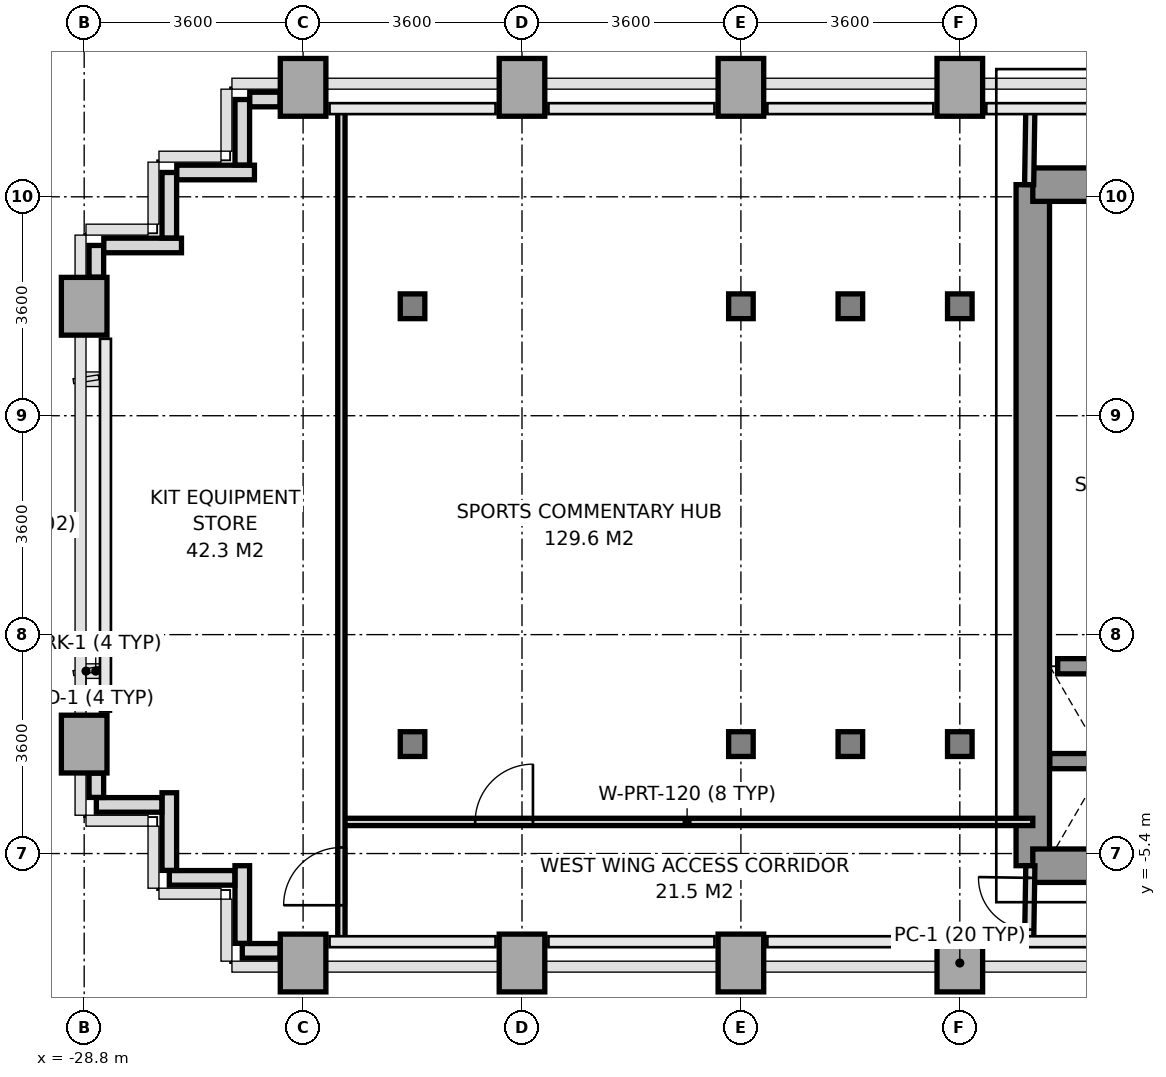
"""IFC4 building model, lengths in metres.
Left out: names, types, materials, properties, quantities, classifications, styles, units other than length and angle.
Written with IfcOpenShell. Run it as: python <this file> out.ifc"""

import sys

from ifc_helpers import new_model, si_unit, direction, frame, frame_2d, origin, origin_2d, place, context, subcontext, project, spatial, rectangle, i_section, extrude, source, transform, mapped, element, fill, save


model = new_model("IFC4")
c1 = context("Model", 3, precision=1e-05, world=origin(), true_north=direction((0.0, 1.0)))
c2 = subcontext(c1, "Body", "Model", "MODEL_VIEW")
j1 = project(units=[si_unit("LENGTHUNIT", "METRE"), si_unit("PLANEANGLEUNIT", "RADIAN")], contexts=[c1])
p1 = place(None, origin())
s1 = spatial("IfcSite", under=j1, at=p1, CompositionType="ELEMENT")
p2 = place(p1, origin())
s2 = spatial("IfcBuilding", under=s1, at=p2, CompositionType="ELEMENT")
p3 = place(p2, frame((0.0, 0.0, 78.2)))
s3 = spatial("IfcBuildingStorey", under=s2, at=p3, CompositionType="ELEMENT", Elevation=78.2)
m1 = source(origin(), c2, "Body", "SweptSolid", [
    extrude(rectangle(XDim=0.75, YDim=0.95, at=origin_2d()), origin(), (0.0, 0.0, 1.0), 3.2),
])
for number, where, z_axis, x_axis in (
    (1, (-28.8, -3.6, 0.0), (0.0, 0.0, 1.0), (1.0, 0.0, 0.0)),
    (2, (-28.8, 3.6, 0.0), (0.0, 0.0, 1.0), (1.0, 0.0, 0.0)),
    (3, (-25.2, -7.2, 0.0), (0.0, 0.0, 1.0), (1.0, 0.0, 0.0)),
    (4, (-25.2, 7.2, 0.0), (0.0, 0.0, 1.0), (1.0, 0.0, 0.0)),
):
    element("IfcColumn", number, at=place(p3, frame(where, z_axis=z_axis, x_axis=x_axis)), inside=s3, PredefinedType="COLUMN", context=c2, shape_type="MappedRepresentation", body=[
        mapped(m1, transform((0.0, 0.0, 0.0), x_axis=(1.0, 0.0, 0.0), y_axis=(0.0, 1.0, 0.0), z_axis=(0.0, 0.0, 1.0), scale=1.0)),
    ])
m2 = source(origin(), c2, "Body", "SweptSolid", [
    extrude(i_section(OverallWidth=0.404, OverallDepth=0.407, WebThickness=0.022, FlangeThickness=0.035, at=origin_2d()), origin(), (0.0, 0.0, 1.0), 3.2),
])
for number, where, z_axis, x_axis in (
    (5, (-23.4, -3.6, 0.0), (0.0, 0.0, 1.0), (1.0, 0.0, 0.0)),
    (6, (-23.4, 3.6, 0.0), (0.0, 0.0, 1.0), (1.0, 0.0, 0.0)),
):
    element("IfcColumn", number, at=place(p3, frame(where, z_axis=z_axis, x_axis=x_axis)), inside=s3, PredefinedType="COLUMN", context=c2, shape_type="MappedRepresentation", body=[
        mapped(m2, transform((0.0, 0.0, 0.0), x_axis=(1.0, 0.0, 0.0), y_axis=(0.0, 1.0, 0.0), z_axis=(0.0, 0.0, 1.0), scale=1.0)),
    ])
for number, where, z_axis, x_axis in (
    (7, (-21.6, -7.2, 0.0), (0.0, 0.0, 1.0), (1.0, 0.0, 0.0)),
    (8, (-21.6, 7.2, 0.0), (0.0, 0.0, 1.0), (1.0, 0.0, 0.0)),
    (9, (-18.0, -7.2, 0.0), (0.0, 0.0, 1.0), (1.0, 0.0, 0.0)),
):
    element("IfcColumn", number, at=place(p3, frame(where, z_axis=z_axis, x_axis=x_axis)), inside=s3, PredefinedType="COLUMN", context=c2, shape_type="MappedRepresentation", body=[
        mapped(m1, transform((0.0, 0.0, 0.0), x_axis=(1.0, 0.0, 0.0), y_axis=(0.0, 1.0, 0.0), z_axis=(0.0, 0.0, 1.0), scale=1.0)),
    ])
for number, where, z_axis, x_axis in (
    (10, (-18.0, -3.6, 0.0), (0.0, 0.0, 1.0), (1.0, 0.0, 0.0)),
    (11, (-18.0, 3.6, 0.0), (0.0, 0.0, 1.0), (1.0, 0.0, 0.0)),
):
    element("IfcColumn", number, at=place(p3, frame(where, z_axis=z_axis, x_axis=x_axis)), inside=s3, PredefinedType="COLUMN", context=c2, shape_type="MappedRepresentation", body=[
        mapped(m2, transform((0.0, 0.0, 0.0), x_axis=(1.0, 0.0, 0.0), y_axis=(0.0, 1.0, 0.0), z_axis=(0.0, 0.0, 1.0), scale=1.0)),
    ])
p4 = place(p3, frame((-18.0, 7.2, 0.0), z_axis=(0.0, 0.0, 1.0), x_axis=(1.0, 0.0, 0.0)))
e12 = element("IfcColumn", 12, at=p4, inside=s3, PredefinedType="COLUMN", context=c2, shape_type="MappedRepresentation", body=[
    mapped(m1, transform((0.0, 0.0, 0.0), x_axis=(1.0, 0.0, 0.0), y_axis=(0.0, 1.0, 0.0), z_axis=(0.0, 0.0, 1.0), scale=1.0)),
])
for number, where, z_axis, x_axis in (
    (13, (-16.2, -3.6, 0.0), (0.0, 0.0, 1.0), (1.0, 0.0, 0.0)),
    (14, (-16.2, 3.6, 0.0), (0.0, 0.0, 1.0), (1.0, 0.0, 0.0)),
):
    element("IfcColumn", number, at=place(p3, frame(where, z_axis=z_axis, x_axis=x_axis)), inside=s3, PredefinedType="COLUMN", context=c2, shape_type="MappedRepresentation", body=[
        mapped(m2, transform((0.0, 0.0, 0.0), x_axis=(1.0, 0.0, 0.0), y_axis=(0.0, 1.0, 0.0), z_axis=(0.0, 0.0, 1.0), scale=1.0)),
    ])
p5 = place(p3, frame((-14.4, -7.2, 0.0), z_axis=(0.0, 0.0, 1.0), x_axis=(1.0, 0.0, 0.0)))
e15 = element("IfcColumn", 15, at=p5, inside=s3, PredefinedType="COLUMN", context=c2, shape_type="MappedRepresentation", body=[
    mapped(m1, transform((0.0, 0.0, 0.0), x_axis=(1.0, 0.0, 0.0), y_axis=(0.0, 1.0, 0.0), z_axis=(0.0, 0.0, 1.0), scale=1.0)),
])
for number, where, z_axis, x_axis in (
    (16, (-14.4, -3.6, 0.0), (0.0, 0.0, 1.0), (1.0, 0.0, 0.0)),
    (17, (-14.4, 3.6, 0.0), (0.0, 0.0, 1.0), (1.0, 0.0, 0.0)),
):
    element("IfcColumn", number, at=place(p3, frame(where, z_axis=z_axis, x_axis=x_axis)), inside=s3, PredefinedType="COLUMN", context=c2, shape_type="MappedRepresentation", body=[
        mapped(m2, transform((0.0, 0.0, 0.0), x_axis=(1.0, 0.0, 0.0), y_axis=(0.0, 1.0, 0.0), z_axis=(0.0, 0.0, 1.0), scale=1.0)),
    ])
p6 = place(p3, frame((-14.4, 7.2, 0.0), z_axis=(0.0, 0.0, 1.0), x_axis=(1.0, 0.0, 0.0)))
e18 = element("IfcColumn", 18, at=p6, inside=s3, PredefinedType="COLUMN", context=c2, shape_type="MappedRepresentation", body=[
    mapped(m1, transform((0.0, 0.0, 0.0), x_axis=(1.0, 0.0, 0.0), y_axis=(0.0, 1.0, 0.0), z_axis=(0.0, 0.0, 1.0), scale=1.0)),
])
p7 = place(p3, frame((-25.578, -7.0, 0.0), z_axis=(0.0, 0.0, 1.0), x_axis=(-1.0, 0.0, 0.0)))
e19 = element("IfcWall", 19, at=p7, inside=s3, PredefinedType="PARAPET", context=c2, shape_type="SweptSolid", body=[
    extrude(rectangle(XDim=0.622, YDim=0.24, at=frame_2d((0.311, 0.0))), origin(), (0.0, 0.0, 1.0), 1.15),
])
p8 = place(p3, frame((-26.2, -6.877, 0.0), z_axis=(0.0, 0.0, 1.0), x_axis=(0.0, 1.0, 0.0)))
e20 = element("IfcWall", 20, at=p8, inside=s3, PredefinedType="PARAPET", context=c2, shape_type="SweptSolid", body=[
    extrude(rectangle(XDim=1.277, YDim=0.24, at=frame_2d((0.638, 0.0))), origin(), (0.0, 0.0, 1.0), 1.15),
])
p9 = place(p3, frame((-26.323, -5.8, 0.0), z_axis=(0.0, 0.0, 1.0), x_axis=(-1.0, 0.0, 0.0)))
e21 = element("IfcWall", 21, at=p9, inside=s3, PredefinedType="PARAPET", context=c2, shape_type="SweptSolid", body=[
    extrude(rectangle(XDim=1.077, YDim=0.24, at=frame_2d((0.539, 0.0))), origin(), (0.0, 0.0, 1.0), 1.15),
])
p10 = place(p3, frame((-27.4, -5.677, 0.0), z_axis=(0.0, 0.0, 1.0), x_axis=(0.0, 1.0, 0.0)))
e22 = element("IfcWall", 22, at=p10, inside=s3, PredefinedType="PARAPET", context=c2, shape_type="SweptSolid", body=[
    extrude(rectangle(XDim=1.277, YDim=0.24, at=frame_2d((0.639, 0.0))), origin(), (0.0, 0.0, 1.0), 1.15),
])
p11 = place(p3, frame((-27.523, -4.6, 0.0), z_axis=(0.0, 0.0, 1.0), x_axis=(-1.0, 0.0, 0.0)))
e23 = element("IfcWall", 23, at=p11, inside=s3, PredefinedType="PARAPET", context=c2, shape_type="SweptSolid", body=[
    extrude(rectangle(XDim=1.077, YDim=0.24, at=frame_2d((0.539, 0.0))), origin(), (0.0, 0.0, 1.0), 1.15),
])
p12 = place(p3, frame((-28.6, -4.477, 0.0), z_axis=(0.0, 0.0, 1.0), x_axis=(0.0, 1.0, 0.0)))
e24 = element("IfcWall", 24, at=p12, inside=s3, PredefinedType="PARAPET", context=c2, shape_type="SweptSolid", body=[
    extrude(rectangle(XDim=0.399, YDim=0.24, at=frame_2d((0.2, 0.0))), origin(), (0.0, 0.0, 1.0), 1.15),
])
p13 = place(p3, frame((-28.6, 4.078, 0.0), z_axis=(0.0, 0.0, 1.0), x_axis=(0.0, 1.0, 0.0)))
e25 = element("IfcWall", 25, at=p13, inside=s3, PredefinedType="PARAPET", context=c2, shape_type="SweptSolid", body=[
    extrude(rectangle(XDim=0.522, YDim=0.24, at=frame_2d((0.261, 0.0))), origin(), (0.0, 0.0, 1.0), 1.15),
])
p14 = place(p3, frame((-28.477, 4.6, 0.0), z_axis=(0.0, 0.0, 1.0), x_axis=(1.0, 0.0, 0.0)))
e26 = element("IfcWall", 26, at=p14, inside=s3, PredefinedType="PARAPET", context=c2, shape_type="SweptSolid", body=[
    extrude(rectangle(XDim=1.277, YDim=0.24, at=frame_2d((0.639, 0.0))), origin(), (0.0, 0.0, 1.0), 1.15),
])
p15 = place(p3, frame((-27.4, 4.723, 0.0), z_axis=(0.0, 0.0, 1.0), x_axis=(0.0, 1.0, 0.0)))
e27 = element("IfcWall", 27, at=p15, inside=s3, PredefinedType="PARAPET", context=c2, shape_type="SweptSolid", body=[
    extrude(rectangle(XDim=1.077, YDim=0.24, at=frame_2d((0.539, 0.0))), origin(), (0.0, 0.0, 1.0), 1.15),
])
p16 = place(p3, frame((-27.277, 5.8, 0.0), z_axis=(0.0, 0.0, 1.0), x_axis=(1.0, 0.0, 0.0)))
e28 = element("IfcWall", 28, at=p16, inside=s3, PredefinedType="PARAPET", context=c2, shape_type="SweptSolid", body=[
    extrude(rectangle(XDim=1.277, YDim=0.24, at=frame_2d((0.639, 0.0))), origin(), (0.0, 0.0, 1.0), 1.15),
])
p17 = place(p3, frame((-26.2, 5.923, 0.0), z_axis=(0.0, 0.0, 1.0), x_axis=(0.0, 1.0, 0.0)))
e29 = element("IfcWall", 29, at=p17, inside=s3, PredefinedType="PARAPET", context=c2, shape_type="SweptSolid", body=[
    extrude(rectangle(XDim=1.077, YDim=0.24, at=frame_2d((0.539, 0.0))), origin(), (0.0, 0.0, 1.0), 1.15),
])
p18 = place(p3, frame((-26.077, 7.0, 0.0), z_axis=(0.0, 0.0, 1.0), x_axis=(1.0, 0.0, 0.0)))
e30 = element("IfcWall", 30, at=p18, inside=s3, PredefinedType="PARAPET", context=c2, shape_type="SweptSolid", body=[
    extrude(rectangle(XDim=0.499, YDim=0.24, at=frame_2d((0.25, 0.0))), origin(), (0.0, 0.0, 1.0), 1.15),
])
p19 = place(p3, frame((-13.2, -5.6, 0.0), z_axis=(0.0, 0.0, 1.0), x_axis=(0.0, 1.0, 0.0)))
e31 = element("IfcWall", 31, at=p19, inside=s3, PredefinedType="SHEAR", context=c2, shape_type="SweptSolid", body=[
    extrude(rectangle(XDim=11.2, YDim=0.55, at=frame_2d((5.6, 0.0))), origin(), (0.0, 0.0, 1.0), 3.2),
])
p20 = place(p3, frame((-13.2, 5.6, 0.0), z_axis=(0.0, 0.0, 1.0), x_axis=(1.0, 0.0, 0.0)))
e32 = element("IfcWall", 32, at=p20, inside=s3, PredefinedType="SHEAR", context=c2, shape_type="SweptSolid", body=[
    extrude(rectangle(XDim=1.819, YDim=0.55, at=frame_2d((0.909, 0.0))), origin(), (0.0, 0.0, 1.0), 3.2),
])
p21 = place(p3, frame((-13.2, -5.6, 0.0), z_axis=(0.0, 0.0, 1.0), x_axis=(1.0, 0.0, 0.0)))
e33 = element("IfcWall", 33, at=p21, inside=s3, PredefinedType="SHEAR", context=c2, shape_type="SweptSolid", body=[
    extrude(rectangle(XDim=7.8, YDim=0.55, at=frame_2d((3.9, 0.0))), origin(), (0.0, 0.0, 1.0), 3.2),
])
p22 = place(p21, frame((3.6, 0.0, 0.0)))
e34 = element("IfcOpeningElement", 34, at=p22, cuts=e33, PredefinedType="OPENING", context=c2, shape_type="SweptSolid", body=[
    extrude(rectangle(XDim=1.2, YDim=2.2, at=frame_2d((0.6, 1.1))), frame((0.0, 0.285, 0.0), z_axis=(0.0, -1.0, 0.0), x_axis=(1.0, 0.0, 0.0)), (0.0, 0.0, 1.0), 0.57),
])
p23 = place(p3, frame((-12.92, -3.88, 0.0), z_axis=(0.0, 0.0, 1.0), x_axis=(1.0, 0.0, 0.0)))
e35 = element("IfcWall", 35, at=p23, inside=s3, PredefinedType="SOLIDWALL", context=c2, shape_type="SweptSolid", body=[
    extrude(rectangle(XDim=1.84, YDim=0.25, at=frame_2d((0.92, 0.0))), origin(), (0.0, 0.0, 1.0), 3.2),
])
p24 = place(p3, frame((-12.791, -2.32, 0.0), z_axis=(0.0, 0.0, 1.0), x_axis=(1.0, 0.0, 0.0)))
e36 = element("IfcWall", 36, at=p24, inside=s3, PredefinedType="SOLIDWALL", context=c2, shape_type="SweptSolid", body=[
    extrude(rectangle(XDim=1.582, YDim=0.25, at=frame_2d((0.791, 0.0))), origin(), (0.0, 0.0, 1.0), 3.2),
])
p25 = place(p3, frame((-13.26, 5.6, 0.0), z_axis=(0.0, 0.0, 1.0), x_axis=(0.016013571389, 0.999871774545, 0.0)))
e37 = element("IfcWall", 37, at=p25, inside=s3, PredefinedType="PARTITIONING", context=c2, shape_type="SweptSolid", body=[
    extrude(rectangle(XDim=1.25, YDim=0.15, at=frame_2d((0.625, 0.0))), origin(), (0.0, 0.0, 1.0), 3.2),
])
p26 = place(p3, frame((-13.26, -6.85, 0.0), z_axis=(0.0, 0.0, 1.0), x_axis=(0.016013571389, 0.999871774545, 0.0)))
e38 = element("IfcWall", 38, at=p26, inside=s3, PredefinedType="PARTITIONING", context=c2, shape_type="SweptSolid", body=[
    extrude(rectangle(XDim=1.25, YDim=0.15, at=frame_2d((0.625, 0.0))), origin(), (0.0, 0.0, 1.0), 3.2),
])
p27 = place(p26, frame((0.2, 0.0, 0.0)))
e39 = element("IfcOpeningElement", 39, at=p27, cuts=e38, PredefinedType="OPENING", context=c2, shape_type="SweptSolid", body=[
    extrude(rectangle(XDim=0.85, YDim=2.1, at=frame_2d((0.425, 1.05))), frame((0.0, 0.085, 0.0), z_axis=(0.0, -1.0, 0.0), x_axis=(1.0, 0.0, 0.0)), (0.0, 0.0, 1.0), 0.17),
])
p28 = place(p3, frame((-24.57, -4.88, 0.0), z_axis=(0.0, 0.0, 1.0), x_axis=(1.0, 0.0, 0.0)))
e40 = element("IfcWall", 40, at=p28, inside=s3, PredefinedType="PARTITIONING", context=c2, shape_type="SweptSolid", body=[
    extrude(rectangle(XDim=11.37, YDim=0.12, at=frame_2d((5.685, 0.0))), origin(), (0.0, 0.0, 1.0), 2.7),
])
p29 = place(p28, frame((2.2, 0.0, 0.0)))
e41 = element("IfcOpeningElement", 41, at=p29, cuts=e40, PredefinedType="OPENING", context=c2, shape_type="SweptSolid", body=[
    extrude(rectangle(XDim=0.95, YDim=2.15, at=frame_2d((0.475, 1.075))), frame((0.0, 0.07, 0.0), z_axis=(0.0, -1.0, 0.0), x_axis=(1.0, 0.0, 0.0)), (0.0, 0.0, 1.0), 0.14),
])
p30 = place(p3, frame((-24.57, -6.85, 0.0), z_axis=(0.0, 0.0, 1.0), x_axis=(0.0, 1.0, 0.0)))
e42 = element("IfcWall", 42, at=p30, inside=s3, PredefinedType="PARTITIONING", context=c2, shape_type="SweptSolid", body=[
    extrude(rectangle(XDim=13.7, YDim=0.12, at=frame_2d((6.85, 0.0))), origin(), (0.0, 0.0, 1.0), 2.65),
])
p31 = place(p30, frame((0.6, 0.0, 0.0)))
e43 = element("IfcOpeningElement", 43, at=p31, cuts=e42, PredefinedType="OPENING", context=c2, shape_type="SweptSolid", body=[
    extrude(rectangle(XDim=0.95, YDim=2.15, at=frame_2d((0.475, 1.075))), frame((0.0, 0.07, 0.0), z_axis=(0.0, -1.0, 0.0), x_axis=(1.0, 0.0, 0.0)), (0.0, 0.0, 1.0), 0.14),
])
m3 = source(origin(), c2, "Body", "SweptSolid", [
    extrude(rectangle(XDim=0.95, YDim=2.15, at=frame_2d((0.475, 1.075))), frame((0.0, 0.025, 0.0), z_axis=(0.0, -1.0, 0.0), x_axis=(1.0, 0.0, 0.0)), (0.0, 0.0, 1.0), 0.05),
])
p32 = place(p29, origin())
e44 = element("IfcDoor", 44, at=p32, inside=s3, OperationType="SINGLE_SWING_RIGHT", PredefinedType="DOOR", context=c2, shape_type="MappedRepresentation", body=[
    mapped(m3, transform((0.0, 0.0, 0.0), x_axis=(1.0, 0.0, 0.0), y_axis=(0.0, 1.0, 0.0), z_axis=(0.0, 0.0, 1.0), scale=1.0)),
])
fill(e41, e44)
p33 = place(p31, origin())
e45 = element("IfcDoor", 45, at=p33, inside=s3, OperationType="SINGLE_SWING_LEFT", PredefinedType="DOOR", context=c2, shape_type="MappedRepresentation", body=[
    mapped(m3, transform((0.0, 0.0, 0.0), x_axis=(1.0, 0.0, 0.0), y_axis=(0.0, 1.0, 0.0), z_axis=(0.0, 0.0, 1.0), scale=1.0)),
])
fill(e43, e45)
m4 = source(origin(), c2, "Body", "SweptSolid", [
    extrude(rectangle(XDim=0.85, YDim=2.1, at=frame_2d((0.425, 1.05))), frame((0.0, 0.025, 0.0), z_axis=(0.0, -1.0, 0.0), x_axis=(1.0, 0.0, 0.0)), (0.0, 0.0, 1.0), 0.05),
])
p34 = place(p27, origin())
e46 = element("IfcDoor", 46, at=p34, inside=s3, OperationType="SINGLE_SWING_RIGHT", PredefinedType="DOOR", context=c2, shape_type="MappedRepresentation", body=[
    mapped(m4, transform((0.0, 0.0, 0.0), x_axis=(1.0, 0.0, 0.0), y_axis=(0.0, 1.0, 0.0), z_axis=(0.0, 0.0, 1.0), scale=1.0)),
])
fill(e39, e46)
save(model, sys.argv[1])
